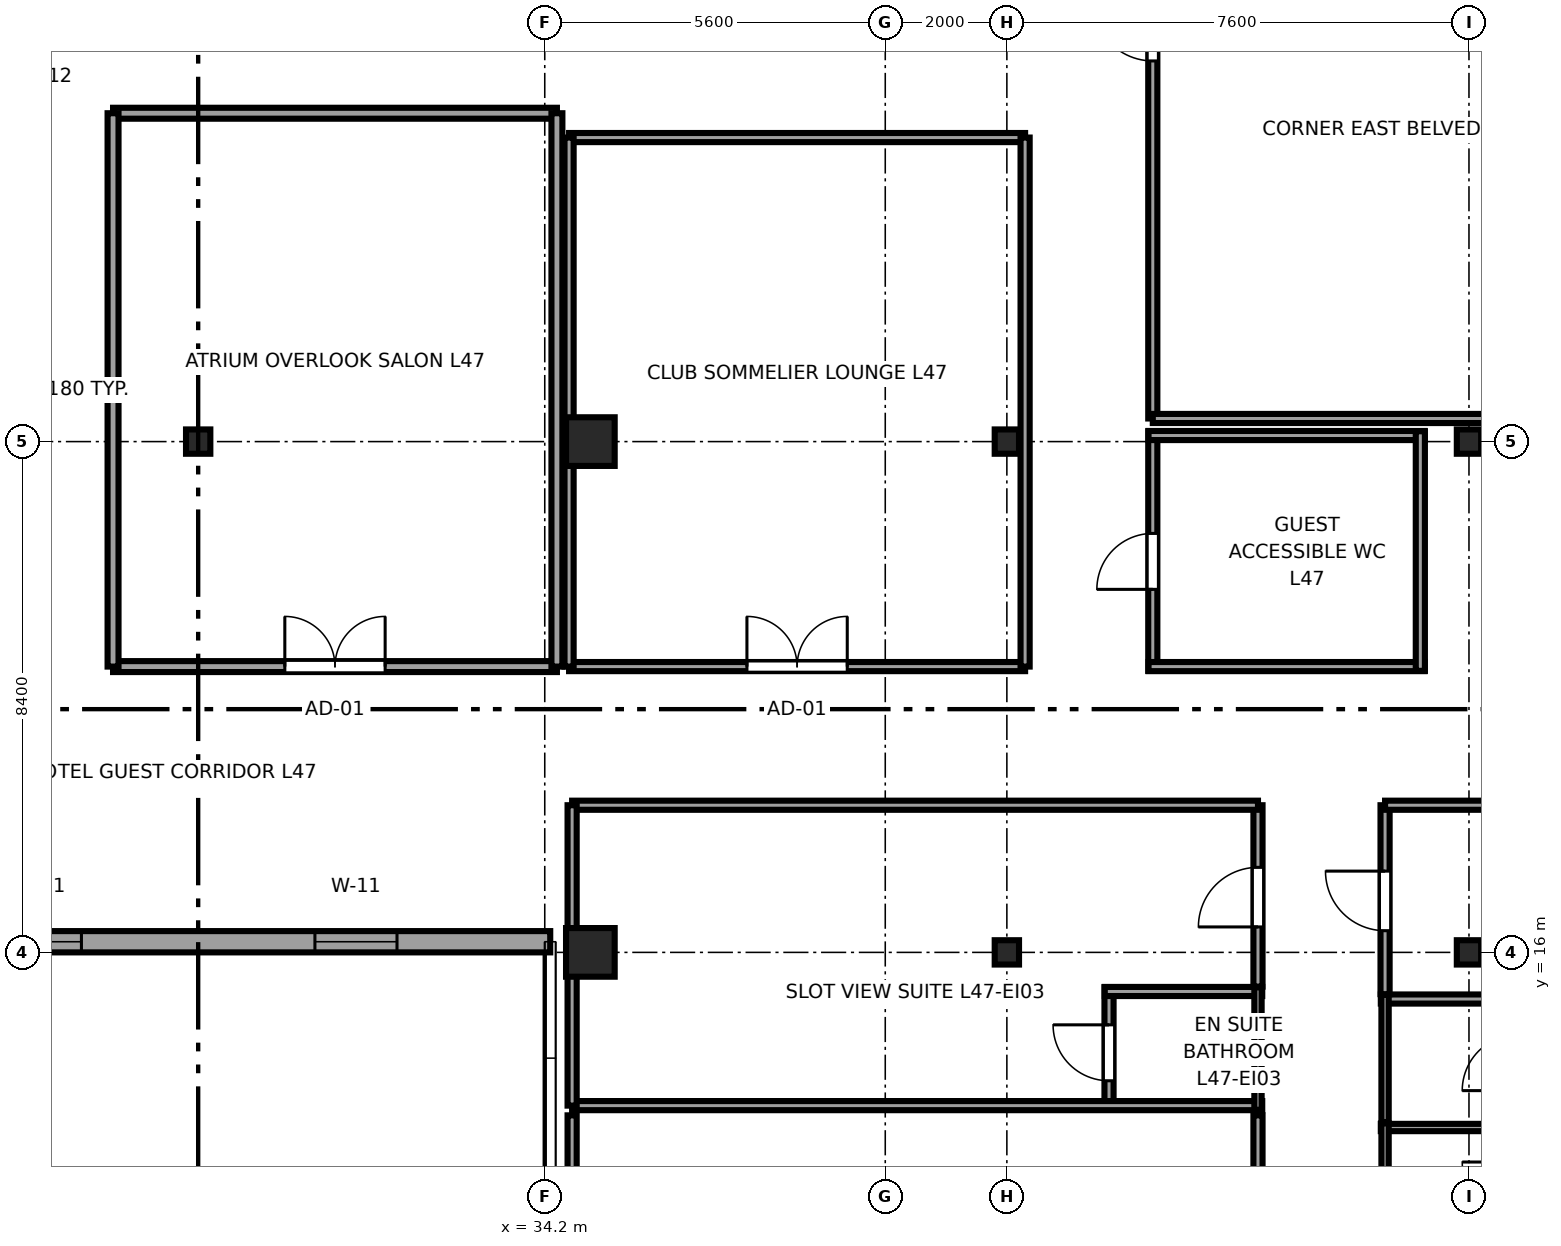
"""IFC4 building model, lengths in metres.
Left out: names, types, materials, properties, quantities, classifications, styles, units other than length and angle.
Written with IfcOpenShell. Run it as: python <this file> out.ifc"""

import sys

from ifc_helpers import new_model, si_unit, direction, frame, frame_2d, origin, origin_2d, place, context, subcontext, project, spatial, rectangle, i_section, extrude, source, transform, mapped, element, fill, save


model = new_model("IFC4")
c1 = context("Model", 3, precision=1e-05, world=origin(), true_north=direction((0.0, 1.0)))
c2 = subcontext(c1, "Body", "Model", "MODEL_VIEW")
j1 = project(units=[si_unit("LENGTHUNIT", "METRE"), si_unit("PLANEANGLEUNIT", "RADIAN")], contexts=[c1])
p1 = place(None, origin())
s1 = spatial("IfcSite", under=j1, at=p1, CompositionType="ELEMENT")
p2 = place(p1, origin())
s2 = spatial("IfcBuilding", under=s1, at=p2, CompositionType="ELEMENT")
p3 = place(p2, frame((0.0, 0.0, 179.0)))
s3 = spatial("IfcBuildingStorey", under=s2, at=p3, CompositionType="ELEMENT", Elevation=179.0)
m1 = source(origin(), c2, "Body", "SweptSolid", [
    extrude(rectangle(XDim=0.8, YDim=0.8, at=origin_2d()), origin(), (0.0, 0.0, 1.0), 3.55),
])
for number, where, z_axis, x_axis in (
    (1, (34.95, 16.0, 0.0), (0.0, 0.0, 1.0), (1.0, 0.0, 0.0)),
    (2, (34.95, 24.4, 0.0), (0.0, 0.0, 1.0), (1.0, 0.0, 0.0)),
):
    element("IfcColumn", number, at=place(p3, frame(where, z_axis=z_axis, x_axis=x_axis)), inside=s3, PredefinedType="COLUMN", context=c2, shape_type="MappedRepresentation", body=[
        mapped(m1, transform((0.0, 0.0, 0.0), x_axis=(1.0, 0.0, 0.0), y_axis=(0.0, 1.0, 0.0), z_axis=(0.0, 0.0, 1.0), scale=1.0)),
    ])
m2 = source(origin(), c2, "Body", "SweptSolid", [
    extrude(i_section(OverallWidth=0.4, OverallDepth=0.4, WebThickness=0.02, FlangeThickness=0.035, at=origin_2d()), origin(), (0.0, 0.0, 1.0), 3.55),
])
for number, where, z_axis, x_axis in (
    (3, (41.8, 16.0, 0.0), (0.0, 0.0, 1.0), (1.0, 0.0, 0.0)),
    (4, (41.8, 24.4, 0.0), (0.0, 0.0, 1.0), (1.0, 0.0, 0.0)),
    (5, (49.4, 16.0, 0.0), (0.0, 0.0, 1.0), (1.0, 0.0, 0.0)),
    (6, (49.4, 24.4, 0.0), (0.0, 0.0, 1.0), (1.0, 0.0, 0.0)),
    (7, (28.5, 24.4, 0.0), (0.0, 0.0, 1.0), (1.0, 0.0, 0.0)),
):
    element("IfcColumn", number, at=place(p3, frame(where, z_axis=z_axis, x_axis=x_axis)), inside=s3, PredefinedType="COLUMN", context=c2, shape_type="MappedRepresentation", body=[
        mapped(m2, transform((0.0, 0.0, 0.0), x_axis=(1.0, 0.0, 0.0), y_axis=(0.0, 1.0, 0.0), z_axis=(0.0, 0.0, 1.0), scale=1.0)),
    ])
p4 = place(p3, frame((22.71, 16.175, 0.0), z_axis=(0.0, 0.0, 1.0), x_axis=(1.0, 0.0, 0.0)))
e8 = element("IfcWall", 8, at=p4, inside=s3, PredefinedType="SOLIDWALL", context=c2, shape_type="SweptSolid", body=[
    extrude(rectangle(XDim=11.58, YDim=0.35, at=frame_2d((5.79, 0.0))), origin(), (0.0, 0.0, 1.0), 2.638),
])
p5 = place(p4, frame((2.52, 0.0, 0.62)))
e9 = element("IfcOpeningElement", 9, at=p5, cuts=e8, PredefinedType="OPENING", context=c2, shape_type="SweptSolid", body=[
    extrude(rectangle(XDim=1.35, YDim=1.6, at=frame_2d((0.675, 0.8))), frame((0.0, 0.185, 0.0), z_axis=(0.0, -1.0, 0.0), x_axis=(1.0, 0.0, 0.0)), (0.0, 0.0, 1.0), 0.37),
])
p6 = place(p4, frame((7.71, 0.0, 0.62)))
e10 = element("IfcOpeningElement", 10, at=p6, cuts=e8, PredefinedType="OPENING", context=c2, shape_type="SweptSolid", body=[
    extrude(rectangle(XDim=1.35, YDim=1.6, at=frame_2d((0.675, 0.8))), frame((0.0, 0.185, 0.0), z_axis=(0.0, -1.0, 0.0), x_axis=(1.0, 0.0, 0.0)), (0.0, 0.0, 1.0), 0.37),
])
p7 = place(p3, frame((43.48, 13.41, 0.0), z_axis=(0.0, 0.0, 1.0), x_axis=(0.0, 1.0, 0.0)))
e11 = element("IfcWall", 11, at=p7, inside=s3, PredefinedType="PARTITIONING", context=c2, shape_type="SweptSolid", body=[
    extrude(rectangle(XDim=2.017, YDim=0.15, at=frame_2d((1.009, 0.0))), origin(), (0.0, 0.0, 1.0), 3.25),
])
p8 = place(p7, frame((0.479, 0.0, 0.0)))
e12 = element("IfcOpeningElement", 12, at=p8, cuts=e11, PredefinedType="OPENING", context=c2, shape_type="SweptSolid", body=[
    extrude(rectangle(XDim=0.92, YDim=2.01, at=frame_2d((0.46, 1.005))), frame((0.0, 0.085, 0.0), z_axis=(0.0, -1.0, 0.0), x_axis=(1.0, 0.0, 0.0)), (0.0, 0.0, 1.0), 0.17),
])
p9 = place(p3, frame((34.65, 13.48, 0.0), z_axis=(0.0, 0.0, 1.0), x_axis=(1.0, 0.0, 0.0)))
e13 = element("IfcWall", 13, at=p9, inside=s3, PredefinedType="PARTITIONING", context=c2, shape_type="SweptSolid", body=[
    extrude(rectangle(XDim=11.35, YDim=0.15, at=frame_2d((5.675, 0.0))), origin(), (0.0, 0.0, 1.0), 3.25),
])
p10 = place(p3, frame((43.41, 15.357, 0.0), z_axis=(0.0, 0.0, 1.0), x_axis=(1.0, 0.0, 0.0)))
e14 = element("IfcWall", 14, at=p10, inside=s3, PredefinedType="PARTITIONING", context=c2, shape_type="SweptSolid", body=[
    extrude(rectangle(XDim=2.59, YDim=0.15, at=frame_2d((1.295, 0.0))), origin(), (0.0, 0.0, 1.0), 3.25),
])
p11 = place(p3, frame((45.93, 13.41, 0.0), z_axis=(0.0, 0.0, 1.0), x_axis=(0.0, 1.0, 0.0)))
e15 = element("IfcWall", 15, at=p11, inside=s3, PredefinedType="PLUMBINGWALL", context=c2, shape_type="SweptSolid", body=[
    extrude(rectangle(XDim=2.017, YDim=0.12, at=frame_2d((1.009, 0.0))), origin(), (0.0, 0.0, 1.0), 3.25),
])
p12 = place(p3, frame((47.95, 13.12, 0.0), z_axis=(0.0, 0.0, 1.0), x_axis=(1.0, 0.0, 0.0)))
e16 = element("IfcWall", 16, at=p12, inside=s3, PredefinedType="PLUMBINGWALL", context=c2, shape_type="SweptSolid", body=[
    extrude(rectangle(XDim=2.329, YDim=0.12, at=frame_2d((1.165, 0.0))), origin(), (0.0, 0.0, 1.0), 3.25),
])
p13 = place(p3, frame((48.02, 11.135, 0.0), z_axis=(0.0, 0.0, 1.0), x_axis=(0.0, 1.0, 0.0)))
e17 = element("IfcWall", 17, at=p13, inside=s3, PredefinedType="PLUMBINGWALL", context=c2, shape_type="SweptSolid", body=[
    extrude(rectangle(XDim=2.055, YDim=0.12, at=frame_2d((1.027, 0.0))), origin(), (0.0, 0.0, 1.0), 3.25),
])
p14 = place(p3, frame((47.95, 15.233, 0.0), z_axis=(0.0, 0.0, 1.0), x_axis=(1.0, 0.0, 0.0)))
e18 = element("IfcWall", 18, at=p14, inside=s3, PredefinedType="PARTITIONING", context=c2, shape_type="SweptSolid", body=[
    extrude(rectangle(XDim=2.329, YDim=0.15, at=frame_2d((1.165, 0.0))), origin(), (0.0, 0.0, 1.0), 3.25),
])
p15 = place(p3, frame((48.02, 13.21, 0.0), z_axis=(0.0, 0.0, 1.0), x_axis=(0.0, 1.0, 0.0)))
e19 = element("IfcWall", 19, at=p15, inside=s3, PredefinedType="PLUMBINGWALL", context=c2, shape_type="SweptSolid", body=[
    extrude(rectangle(XDim=2.093, YDim=0.12, at=frame_2d((1.046, 0.0))), origin(), (0.0, 0.0, 1.0), 3.25),
])
p16 = place(p3, frame((45.93, 10.275, 0.0), z_axis=(0.0, 0.0, 1.0), x_axis=(0.0, 1.0, 0.0)))
e20 = element("IfcWall", 20, at=p16, inside=s3, PredefinedType="PARTITIONING", context=c2, shape_type="SweptSolid", body=[
    extrude(rectangle(XDim=3.045, YDim=0.15, at=frame_2d((1.522, 0.0))), origin(), (0.0, 0.0, 1.0), 3.25),
])
p17 = place(p16, frame((1.012, 0.0, 0.0)))
e21 = element("IfcOpeningElement", 21, at=p17, cuts=e20, PredefinedType="OPENING", context=c2, shape_type="SweptSolid", body=[
    extrude(rectangle(XDim=0.98, YDim=2.12, at=frame_2d((0.49, 1.06))), frame((0.0, 0.085, 0.0), z_axis=(0.0, -1.0, 0.0), x_axis=(1.0, 0.0, 0.0)), (0.0, 0.0, 1.0), 0.17),
])
p18 = place(p3, frame((34.65, 8.28, 0.0), z_axis=(0.0, 0.0, 1.0), x_axis=(0.0, 1.0, 0.0)))
e22 = element("IfcWall", 22, at=p18, inside=s3, PredefinedType="PARTITIONING", context=c2, shape_type="SweptSolid", body=[
    extrude(rectangle(XDim=5.04, YDim=0.15, at=frame_2d((2.52, 0.0))), origin(), (0.0, 0.0, 1.0), 3.25),
])
p19 = place(p3, frame((45.93, 15.437, 0.0), z_axis=(0.0, 0.0, 1.0), x_axis=(0.0, 1.0, 0.0)))
e23 = element("IfcWall", 23, at=p19, inside=s3, PredefinedType="PARTITIONING", context=c2, shape_type="SweptSolid", body=[
    extrude(rectangle(XDim=2.983, YDim=0.15, at=frame_2d((1.491, 0.0))), origin(), (0.0, 0.0, 1.0), 3.25),
])
p20 = place(p19, frame((0.981, 0.0, 0.0)))
e24 = element("IfcOpeningElement", 24, at=p20, cuts=e23, PredefinedType="OPENING", context=c2, shape_type="SweptSolid", body=[
    extrude(rectangle(XDim=0.98, YDim=2.12, at=frame_2d((0.49, 1.06))), frame((0.0, 0.085, 0.0), z_axis=(0.0, -1.0, 0.0), x_axis=(1.0, 0.0, 0.0)), (0.0, 0.0, 1.0), 0.17),
])
p21 = place(p3, frame((34.65, 18.42, 0.0), z_axis=(0.0, 0.0, 1.0), x_axis=(1.0, 0.0, 0.0)))
e25 = element("IfcWall", 25, at=p21, inside=s3, PredefinedType="PARTITIONING", context=c2, shape_type="SweptSolid", body=[
    extrude(rectangle(XDim=11.28, YDim=0.15, at=frame_2d((5.64, 0.0))), origin(), (0.0, 0.0, 1.0), 3.25),
])
p22 = place(p3, frame((34.65, 13.48, 0.0), z_axis=(0.0, 0.0, 1.0), x_axis=(0.0, 1.0, 0.0)))
e26 = element("IfcWall", 26, at=p22, inside=s3, PredefinedType="PARTITIONING", context=c2, shape_type="SweptSolid", body=[
    extrude(rectangle(XDim=4.94, YDim=0.15, at=frame_2d((2.47, 0.0))), origin(), (0.0, 0.0, 1.0), 3.25),
])
p23 = place(p3, frame((48.02, 15.313, 0.0), z_axis=(0.0, 0.0, 1.0), x_axis=(0.0, 1.0, 0.0)))
e27 = element("IfcWall", 27, at=p23, inside=s3, PredefinedType="PARTITIONING", context=c2, shape_type="SweptSolid", body=[
    extrude(rectangle(XDim=3.107, YDim=0.15, at=frame_2d((1.553, 0.0))), origin(), (0.0, 0.0, 1.0), 3.25),
])
p24 = place(p23, frame((1.043, 0.0, 0.0)))
e28 = element("IfcOpeningElement", 28, at=p24, cuts=e27, PredefinedType="OPENING", context=c2, shape_type="SweptSolid", body=[
    extrude(rectangle(XDim=0.98, YDim=2.12, at=frame_2d((0.49, 1.06))), frame((0.0, 0.085, 0.0), z_axis=(0.0, -1.0, 0.0), x_axis=(1.0, 0.0, 0.0)), (0.0, 0.0, 1.0), 0.17),
])
p25 = place(p3, frame((48.02, 18.42, 0.0), z_axis=(0.0, 0.0, 1.0), x_axis=(1.0, 0.0, 0.0)))
e29 = element("IfcWall", 29, at=p25, inside=s3, PredefinedType="PARTITIONING", context=c2, shape_type="SweptSolid", body=[
    extrude(rectangle(XDim=5.975, YDim=0.15, at=frame_2d((2.988, 0.0))), origin(), (0.0, 0.0, 1.0), 3.25),
])
p26 = place(p3, frame((44.2, 20.63, 0.0), z_axis=(0.0, 0.0, 1.0), x_axis=(0.0, 1.0, 0.0)))
e30 = element("IfcWall", 30, at=p26, inside=s3, PredefinedType="PARTITIONING", context=c2, shape_type="SweptSolid", body=[
    extrude(rectangle(XDim=3.94, YDim=0.15, at=frame_2d((1.97, 0.0))), origin(), (0.0, 0.0, 1.0), 3.25),
])
p27 = place(p26, frame((1.34, 0.0, 0.0)))
e31 = element("IfcOpeningElement", 31, at=p27, cuts=e30, PredefinedType="OPENING", context=c2, shape_type="SweptSolid", body=[
    extrude(rectangle(XDim=0.92, YDim=2.01, at=frame_2d((0.46, 1.005))), frame((0.0, 0.085, 0.0), z_axis=(0.0, -1.0, 0.0), x_axis=(1.0, 0.0, 0.0)), (0.0, 0.0, 1.0), 0.17),
])
p28 = place(p3, frame((44.13, 20.7, 0.0), z_axis=(0.0, 0.0, 1.0), x_axis=(1.0, 0.0, 0.0)))
e32 = element("IfcWall", 32, at=p28, inside=s3, PredefinedType="PARTITIONING", context=c2, shape_type="SweptSolid", body=[
    extrude(rectangle(XDim=4.54, YDim=0.15, at=frame_2d((2.27, 0.0))), origin(), (0.0, 0.0, 1.0), 3.25),
])
p29 = place(p3, frame((44.13, 24.5, 0.0), z_axis=(0.0, 0.0, 1.0), x_axis=(1.0, 0.0, 0.0)))
e33 = element("IfcWall", 33, at=p29, inside=s3, PredefinedType="PARTITIONING", context=c2, shape_type="SweptSolid", body=[
    extrude(rectangle(XDim=4.54, YDim=0.15, at=frame_2d((2.27, 0.0))), origin(), (0.0, 0.0, 1.0), 2.638),
])
p30 = place(p3, frame((48.6, 20.63, 0.0), z_axis=(0.0, 0.0, 1.0), x_axis=(0.0, 1.0, 0.0)))
e34 = element("IfcWall", 34, at=p30, inside=s3, PredefinedType="PARTITIONING", context=c2, shape_type="SweptSolid", body=[
    extrude(rectangle(XDim=3.94, YDim=0.15, at=frame_2d((1.97, 0.0))), origin(), (0.0, 0.0, 1.0), 3.25),
])
p31 = place(p3, frame((44.2, 24.78, 0.0), z_axis=(0.0, 0.0, 1.0), x_axis=(0.0, 1.0, 0.0)))
e35 = element("IfcWall", 35, at=p31, inside=s3, PredefinedType="PARTITIONING", context=c2, shape_type="SweptSolid", body=[
    extrude(rectangle(XDim=12.74, YDim=0.15, at=frame_2d((6.37, 0.0))), origin(), (0.0, 0.0, 1.0), 3.25),
])
p32 = place(p31, frame((5.88, 0.0, 0.0)))
e36 = element("IfcOpeningElement", 36, at=p32, cuts=e35, PredefinedType="OPENING", context=c2, shape_type="SweptSolid", body=[
    extrude(rectangle(XDim=0.98, YDim=2.12, at=frame_2d((0.49, 1.06))), frame((0.0, 0.085, 0.0), z_axis=(0.0, -1.0, 0.0), x_axis=(1.0, 0.0, 0.0)), (0.0, 0.0, 1.0), 0.17),
])
p33 = place(p3, frame((44.2, 24.78, 0.0), z_axis=(0.0, 0.0, 1.0), x_axis=(1.0, 0.0, 0.0)))
e37 = element("IfcWall", 37, at=p33, inside=s3, PredefinedType="PARTITIONING", context=c2, shape_type="SweptSolid", body=[
    extrude(rectangle(XDim=9.795, YDim=0.15, at=frame_2d((4.897, 0.0))), origin(), (0.0, 0.0, 1.0), 3.25),
])
p34 = place(p3, frame((27.1, 20.7, 0.0), z_axis=(0.0, 0.0, 1.0), x_axis=(1.0, 0.0, 0.0)))
e38 = element("IfcWall", 38, at=p34, inside=s3, PredefinedType="PARTITIONING", context=c2, shape_type="SweptSolid", body=[
    extrude(rectangle(XDim=7.3, YDim=0.18, at=frame_2d((3.65, 0.0))), origin(), (0.0, 0.0, 1.0), 3.25),
])
p35 = place(p34, frame((2.825, 0.0, 0.0)))
e39 = element("IfcOpeningElement", 39, at=p35, cuts=e38, PredefinedType="OPENING", context=c2, shape_type="SweptSolid", body=[
    extrude(rectangle(XDim=1.65, YDim=2.15, at=frame_2d((0.825, 1.075))), frame((0.0, 0.1, 0.0), z_axis=(0.0, -1.0, 0.0), x_axis=(1.0, 0.0, 0.0)), (0.0, 0.0, 1.0), 0.2),
])
p36 = place(p3, frame((27.1, 29.8, 0.0), z_axis=(0.0, 0.0, 1.0), x_axis=(1.0, 0.0, 0.0)))
e40 = element("IfcWall", 40, at=p36, inside=s3, PredefinedType="PARTITIONING", context=c2, shape_type="SweptSolid", body=[
    extrude(rectangle(XDim=7.3, YDim=0.18, at=frame_2d((3.65, 0.0))), origin(), (0.0, 0.0, 1.0), 3.25),
])
for number, where, z_axis, x_axis in (
    (41, (27.1, 20.7, 0.0), (0.0, 0.0, 1.0), (0.0, 1.0, 0.0)),
    (42, (34.4, 20.7, 0.0), (0.0, 0.0, 1.0), (0.0, 1.0, 0.0)),
):
    element("IfcWall", number, at=place(p3, frame(where, z_axis=z_axis, x_axis=x_axis)), inside=s3, PredefinedType="PARTITIONING", context=c2, shape_type="SweptSolid", body=[
        extrude(rectangle(XDim=9.1, YDim=0.18, at=frame_2d((4.55, 0.0))), origin(), (0.0, 0.0, 1.0), 3.25),
    ])
p37 = place(p3, frame((34.6, 20.7, 0.0), z_axis=(0.0, 0.0, 1.0), x_axis=(1.0, 0.0, 0.0)))
e43 = element("IfcWall", 43, at=p37, inside=s3, PredefinedType="PARTITIONING", context=c2, shape_type="SweptSolid", body=[
    extrude(rectangle(XDim=7.5, YDim=0.15, at=frame_2d((3.75, 0.0))), origin(), (0.0, 0.0, 1.0), 3.25),
])
p38 = place(p37, frame((2.925, 0.0, 0.0)))
e44 = element("IfcOpeningElement", 44, at=p38, cuts=e43, PredefinedType="OPENING", context=c2, shape_type="SweptSolid", body=[
    extrude(rectangle(XDim=1.65, YDim=2.15, at=frame_2d((0.825, 1.075))), frame((0.0, 0.085, 0.0), z_axis=(0.0, -1.0, 0.0), x_axis=(1.0, 0.0, 0.0)), (0.0, 0.0, 1.0), 0.17),
])
p39 = place(p3, frame((34.6, 29.4, 0.0), z_axis=(0.0, 0.0, 1.0), x_axis=(1.0, 0.0, 0.0)))
e45 = element("IfcWall", 45, at=p39, inside=s3, PredefinedType="PARTITIONING", context=c2, shape_type="SweptSolid", body=[
    extrude(rectangle(XDim=7.5, YDim=0.15, at=frame_2d((3.75, 0.0))), origin(), (0.0, 0.0, 1.0), 3.25),
])
p40 = place(p3, frame((34.6, 20.7, 0.0), z_axis=(0.0, 0.0, 1.0), x_axis=(0.0, 1.0, 0.0)))
e46 = element("IfcWall", 46, at=p40, inside=s3, PredefinedType="PARTITIONING", context=c2, shape_type="SweptSolid", body=[
    extrude(rectangle(XDim=8.7, YDim=0.15, at=frame_2d((4.35, 0.0))), origin(), (0.0, 0.0, 1.0), 3.25),
])
p41 = place(p3, frame((42.1, 20.7, 0.0), z_axis=(0.0, 0.0, 1.0), x_axis=(0.0, 1.0, 0.0)))
e47 = element("IfcWall", 47, at=p41, inside=s3, PredefinedType="PARTITIONING", context=c2, shape_type="SweptSolid", body=[
    extrude(rectangle(XDim=8.7, YDim=0.15, at=frame_2d((4.35, 0.0))), origin(), (0.0, 0.0, 1.0), 2.04),
])
m3 = source(origin(), c2, "Body", "SweptSolid", [
    extrude(rectangle(XDim=1.35, YDim=1.6, at=frame_2d((0.675, 0.8))), frame((0.0, 0.09, 0.0), z_axis=(0.0, -1.0, 0.0), x_axis=(1.0, 0.0, 0.0)), (0.0, 0.0, 1.0), 0.06),
])
p42 = place(p5, origin())
e48 = element("IfcWindow", 48, at=p42, inside=s3, PartitioningType="SINGLE_PANEL", PredefinedType="WINDOW", context=c2, shape_type="MappedRepresentation", body=[
    mapped(m3, transform((0.0, 0.0, 0.0), x_axis=(1.0, 0.0, 0.0), y_axis=(0.0, 1.0, 0.0), z_axis=(0.0, 0.0, 1.0), scale=1.0)),
])
fill(e9, e48)
p43 = place(p6, origin())
e49 = element("IfcWindow", 49, at=p43, inside=s3, PartitioningType="SINGLE_PANEL", PredefinedType="WINDOW", context=c2, shape_type="MappedRepresentation", body=[
    mapped(m3, transform((0.0, 0.0, 0.0), x_axis=(1.0, 0.0, 0.0), y_axis=(0.0, 1.0, 0.0), z_axis=(0.0, 0.0, 1.0), scale=1.0)),
])
fill(e10, e49)
m4 = source(origin(), c2, "Body", "SweptSolid", [
    extrude(rectangle(XDim=0.92, YDim=2.01, at=frame_2d((0.46, 1.005))), frame((0.0, 0.025, 0.0), z_axis=(0.0, -1.0, 0.0), x_axis=(1.0, 0.0, 0.0)), (0.0, 0.0, 1.0), 0.05),
])
p44 = place(p8, origin())
e50 = element("IfcDoor", 50, at=p44, inside=s3, OperationType="SINGLE_SWING_RIGHT", PredefinedType="DOOR", context=c2, shape_type="MappedRepresentation", body=[
    mapped(m4, transform((0.0, 0.0, 0.0), x_axis=(1.0, 0.0, 0.0), y_axis=(0.0, 1.0, 0.0), z_axis=(0.0, 0.0, 1.0), scale=1.0)),
])
fill(e12, e50)
m5 = source(origin(), c2, "Body", "SweptSolid", [
    extrude(rectangle(XDim=0.98, YDim=2.12, at=frame_2d((0.49, 1.06))), frame((0.0, 0.025, 0.0), z_axis=(0.0, -1.0, 0.0), x_axis=(1.0, 0.0, 0.0)), (0.0, 0.0, 1.0), 0.05),
])
p45 = place(p20, origin())
e51 = element("IfcDoor", 51, at=p45, inside=s3, OperationType="SINGLE_SWING_LEFT", PredefinedType="DOOR", context=c2, shape_type="MappedRepresentation", body=[
    mapped(m5, transform((0.0, 0.0, 0.0), x_axis=(1.0, 0.0, 0.0), y_axis=(0.0, 1.0, 0.0), z_axis=(0.0, 0.0, 1.0), scale=1.0)),
])
fill(e24, e51)
p46 = place(p24, origin())
e52 = element("IfcDoor", 52, at=p46, inside=s3, OperationType="SINGLE_SWING_RIGHT", PredefinedType="DOOR", context=c2, shape_type="MappedRepresentation", body=[
    mapped(m5, transform((0.0, 0.0, 0.0), x_axis=(1.0, 0.0, 0.0), y_axis=(0.0, 1.0, 0.0), z_axis=(0.0, 0.0, 1.0), scale=1.0)),
])
fill(e28, e52)
p47 = place(p27, origin())
e53 = element("IfcDoor", 53, at=p47, inside=s3, OperationType="SINGLE_SWING_LEFT", PredefinedType="DOOR", context=c2, shape_type="MappedRepresentation", body=[
    mapped(m4, transform((0.0, 0.0, 0.0), x_axis=(1.0, 0.0, 0.0), y_axis=(0.0, 1.0, 0.0), z_axis=(0.0, 0.0, 1.0), scale=1.0)),
])
fill(e31, e53)
p48 = place(p32, origin())
e54 = element("IfcDoor", 54, at=p48, inside=s3, OperationType="SINGLE_SWING_RIGHT", PredefinedType="DOOR", context=c2, shape_type="MappedRepresentation", body=[
    mapped(m5, transform((0.0, 0.0, 0.0), x_axis=(1.0, 0.0, 0.0), y_axis=(0.0, 1.0, 0.0), z_axis=(0.0, 0.0, 1.0), scale=1.0)),
])
fill(e36, e54)
m6 = source(origin(), c2, "Body", "SweptSolid", [
    extrude(rectangle(XDim=1.65, YDim=2.15, at=frame_2d((0.825, 1.075))), frame((0.0, 0.025, 0.0), z_axis=(0.0, -1.0, 0.0), x_axis=(1.0, 0.0, 0.0)), (0.0, 0.0, 1.0), 0.05),
])
p49 = place(p35, origin())
e55 = element("IfcDoor", 55, at=p49, inside=s3, OperationType="DOUBLE_DOOR_SINGLE_SWING", PredefinedType="DOOR", context=c2, shape_type="MappedRepresentation", body=[
    mapped(m6, transform((0.0, 0.0, 0.0), x_axis=(1.0, 0.0, 0.0), y_axis=(0.0, 1.0, 0.0), z_axis=(0.0, 0.0, 1.0), scale=1.0)),
])
fill(e39, e55)
p50 = place(p38, origin())
e56 = element("IfcDoor", 56, at=p50, inside=s3, OperationType="DOUBLE_DOOR_SINGLE_SWING", PredefinedType="DOOR", context=c2, shape_type="MappedRepresentation", body=[
    mapped(m6, transform((0.0, 0.0, 0.0), x_axis=(1.0, 0.0, 0.0), y_axis=(0.0, 1.0, 0.0), z_axis=(0.0, 0.0, 1.0), scale=1.0)),
])
fill(e44, e56)
save(model, sys.argv[1])
